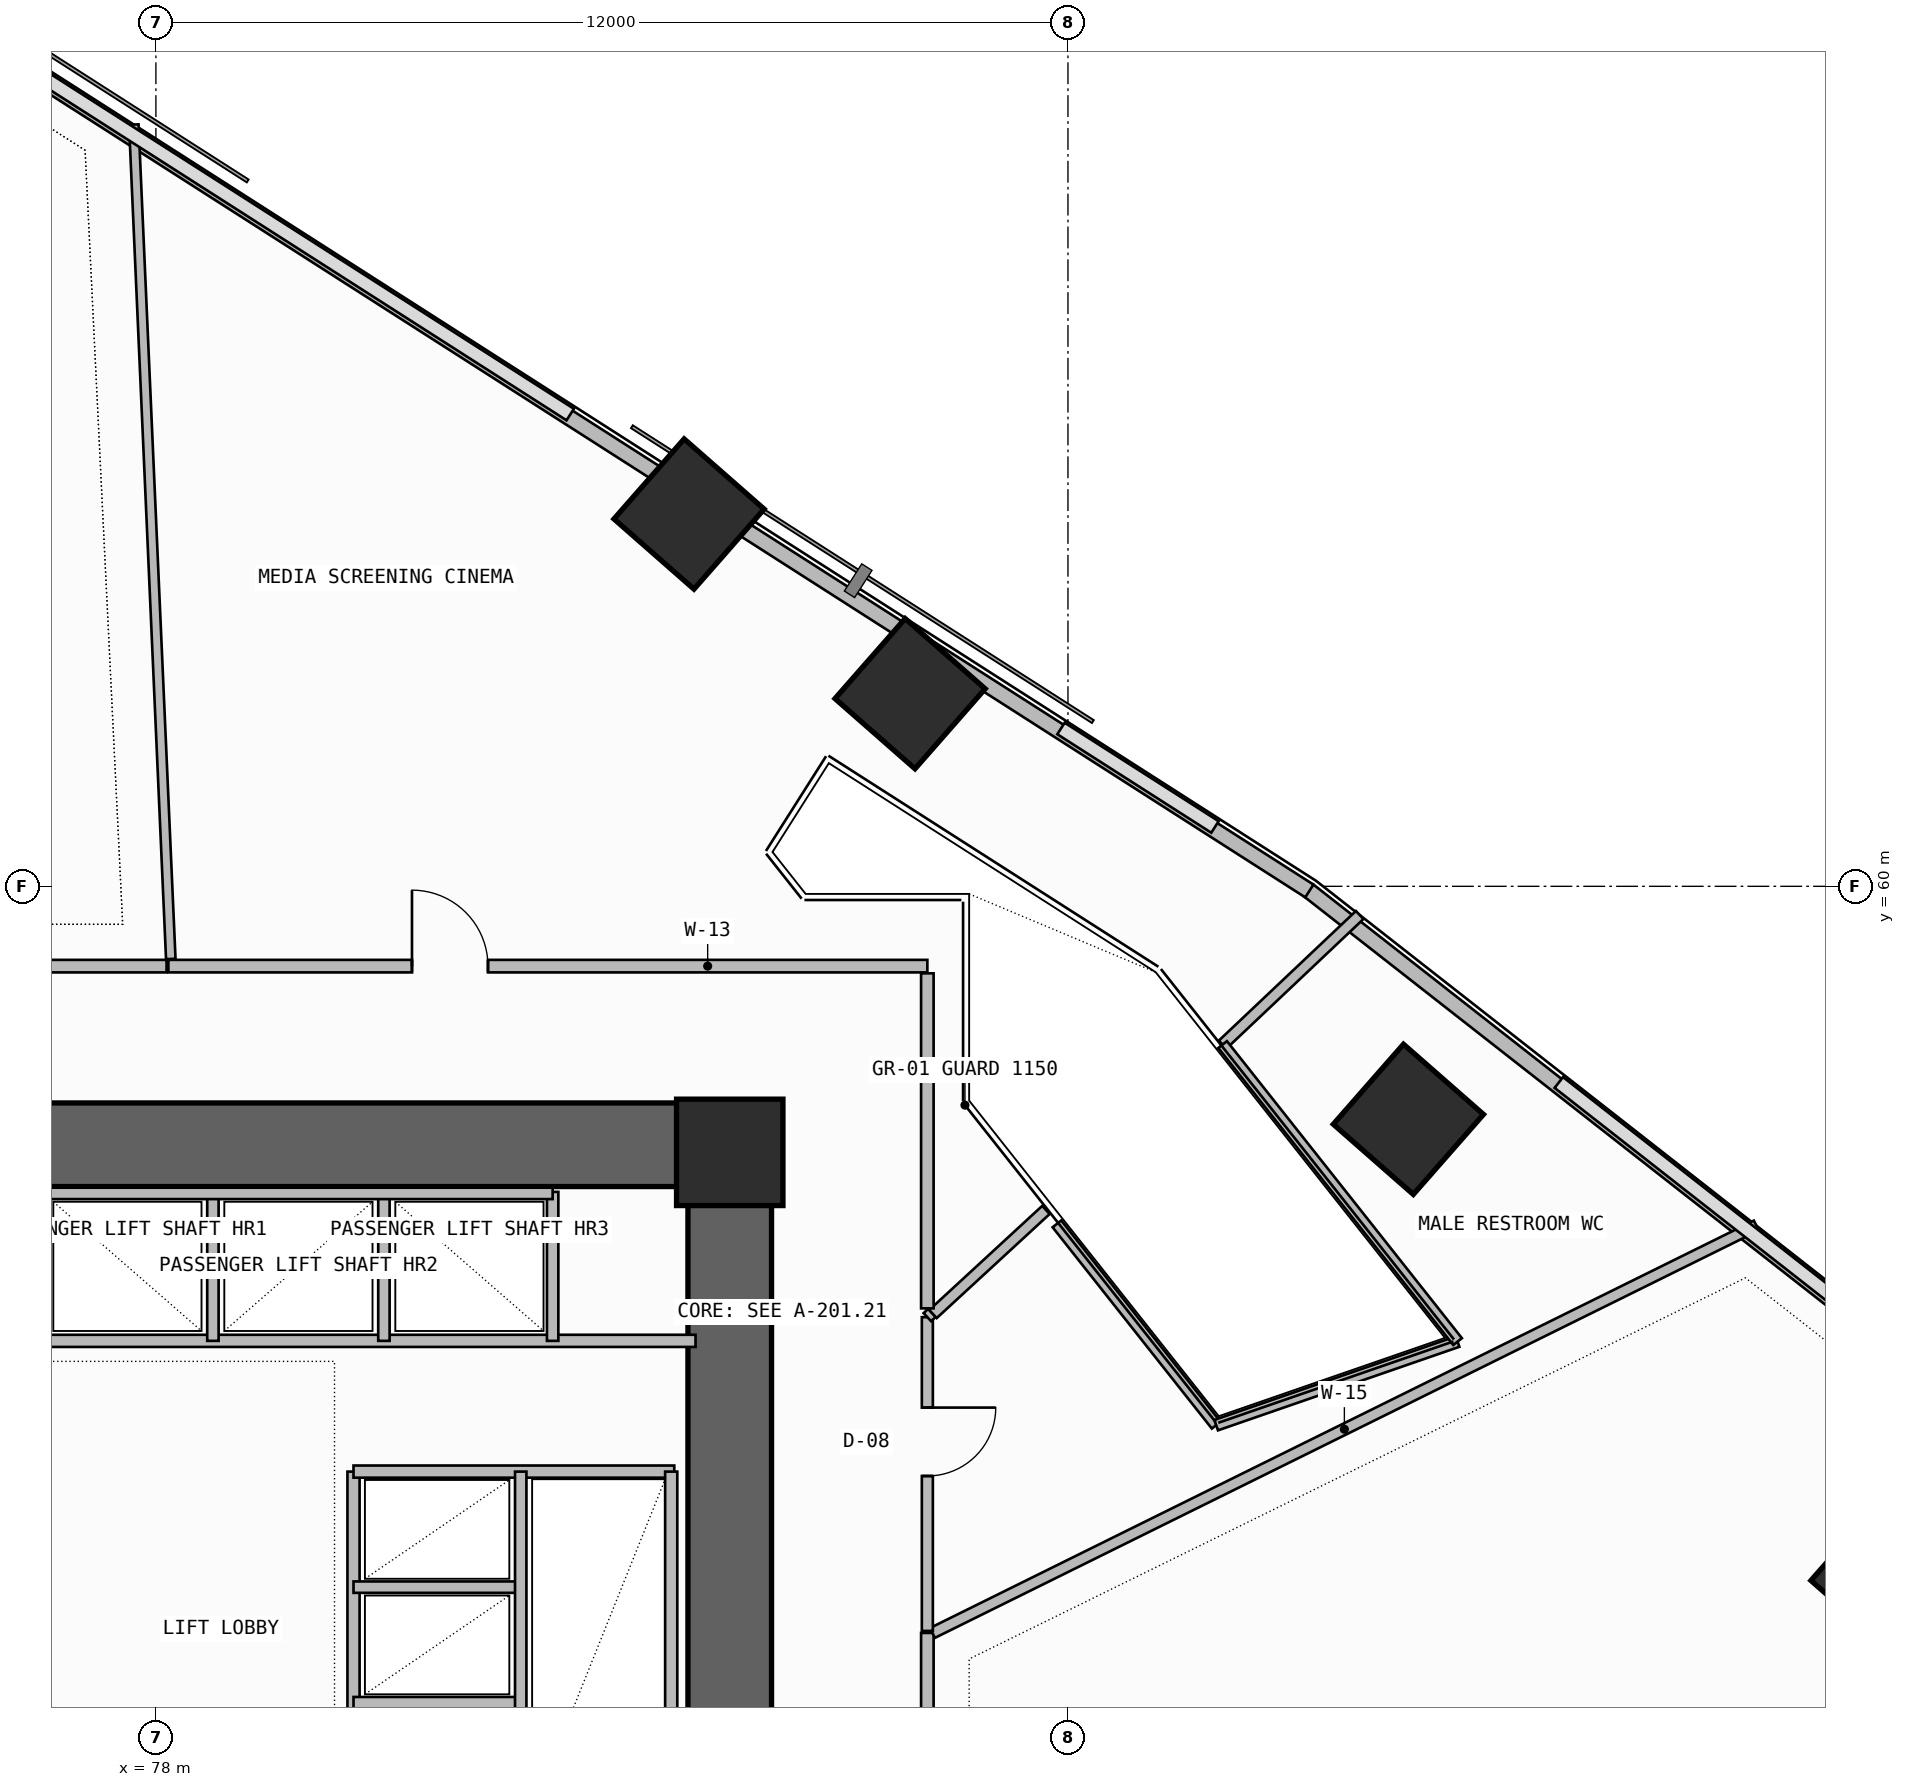
"""IFC4 building model, lengths in metres.
Left out: names, types, materials, properties, quantities, classifications, styles, units other than length and angle.
Written with IfcOpenShell. Run it as: python <this file> out.ifc"""

import sys

from ifc_helpers import new_model, si_unit, direction, frame, frame_2d, origin, origin_2d, place, context, subcontext, project, spatial, rectangle, extrude, element, fill, save


model = new_model("IFC4")
c1 = context("Model", 3, precision=1e-05, world=origin(), true_north=direction((0.0, 1.0)))
c2 = subcontext(c1, "Body", "Model", "MODEL_VIEW")
j1 = project(units=[si_unit("LENGTHUNIT", "METRE"), si_unit("PLANEANGLEUNIT", "RADIAN")], contexts=[c1])
p1 = place(None, origin())
s1 = spatial("IfcSite", under=j1, at=p1, CompositionType="ELEMENT")
p2 = place(p1, origin())
s2 = spatial("IfcBuilding", under=s1, at=p2, CompositionType="ELEMENT")
p3 = place(p2, frame((0.0, 0.0, 74.1)))
s3 = spatial("IfcBuildingStorey", under=s2, at=p3, CompositionType="ELEMENT", Elevation=74.1)
p4 = place(p3, frame((71.8, 56.6, -0.26), z_axis=(0.0, 0.0, 1.0), x_axis=(1.0, 0.0, 0.0)))
e1 = element("IfcWall", 1, at=p4, inside=s3, PredefinedType="SHEAR", context=c2, shape_type="SweptSolid", body=[
    extrude(rectangle(XDim=14.3, YDim=1.1, at=frame_2d((7.15, 0.0))), origin(), (0.0, 0.0, 1.0), 3.6),
])
p5 = place(p3, frame((85.55, 47.6, -0.26), z_axis=(0.0, 0.0, 1.0), x_axis=(0.0, 1.0, 0.0)))
e2 = element("IfcWall", 2, at=p5, inside=s3, PredefinedType="SHEAR", context=c2, shape_type="SweptSolid", body=[
    extrude(rectangle(XDim=8.45, YDim=1.1, at=frame_2d((4.225, 0.0))), origin(), (0.0, 0.0, 1.0), 3.6),
])
for number, where, z_axis, x_axis in (
    (3, (85.55, 56.5, 0.0), (0.0, 0.0, 1.0), (1.0, 0.0, 0.0)),
    (4, (100.763, 50.932, 0.0), (0.0, 0.0, 1.0), (0.659, 0.752, 0.0)),
    (5, (94.479, 56.935, 0.0), (0.0, 0.0, 1.0), (0.659, 0.752, 0.0)),
    (6, (87.923, 62.534, 0.0), (0.0, 0.0, 1.0), (0.659, 0.752, 0.0)),
    (7, (85.015, 64.898, 0.0), (0.0, 0.0, 1.0), (0.659, 0.752, 0.0)),
):
    element("IfcColumn", number, at=place(p3, frame(where, z_axis=z_axis, x_axis=x_axis)), inside=s3, PredefinedType="COLUMN", context=c2, shape_type="SweptSolid", body=[
        extrude(rectangle(XDim=1.4, YDim=1.4, at=origin_2d()), origin(), (0.0, 0.0, 1.0), 3.6),
    ])
p6 = place(p3, frame((121.476, 37.781, 0.0), z_axis=(0.0, 0.0, 1.0), x_axis=(-0.787385636484, 0.61646075257, 0.0)))
e8 = element("IfcWall", 8, at=p6, inside=s3, PredefinedType="PARAPET", context=c2, shape_type="SweptSolid", body=[
    extrude(rectangle(XDim=35.957, YDim=0.2, at=frame_2d((17.979, 0.0))), origin(), (0.0, 0.0, 1.0), 1.15),
])
p7 = place(p3, frame((93.176, 59.939, 0.0), z_axis=(0.0, 0.0, 1.0), x_axis=(-0.842413081081, 0.538832256666, 0.0)))
e9 = element("IfcWall", 9, at=p7, inside=s3, PredefinedType="PARAPET", context=c2, shape_type="SweptSolid", body=[
    extrude(rectangle(XDim=9.011, YDim=0.2, at=frame_2d((4.505, 0.0))), origin(), (0.0, 0.0, 1.0), 1.15),
])
p8 = place(p3, frame((84.682, 65.372, 0.0), z_axis=(0.0, 0.0, 1.0), x_axis=(-0.842418773655, 0.538823356763, 0.0)))
e10 = element("IfcWall", 10, at=p8, inside=s3, PredefinedType="PARAPET", context=c2, shape_type="SweptSolid", body=[
    extrude(rectangle(XDim=19.612, YDim=0.2, at=frame_2d((9.806, 0.0))), origin(), (0.0, 0.0, 1.0), 1.15),
])
p9 = place(p3, frame((80.6, 47.7, 0.0), z_axis=(0.0, 0.0, 1.0), x_axis=(0.0, 1.0, 0.0)))
e11 = element("IfcWall", 11, at=p9, inside=s3, PredefinedType="SOLIDWALL", context=c2, shape_type="SweptSolid", body=[
    extrude(rectangle(XDim=4.6, YDim=0.16, at=frame_2d((2.3, 0.0))), origin(), (0.0, 0.0, 1.0), 3.34),
])
p10 = place(p3, frame((80.6, 52.3, 0.0), z_axis=(0.0, 0.0, 1.0), x_axis=(1.0, 0.0, 0.0)))
e12 = element("IfcWall", 12, at=p10, inside=s3, PredefinedType="SOLIDWALL", context=c2, shape_type="SweptSolid", body=[
    extrude(rectangle(XDim=4.22, YDim=0.16, at=frame_2d((2.11, 0.0))), origin(), (0.0, 0.0, 1.0), 3.34),
])
for number, where, z_axis, x_axis in (
    (13, (80.6, 49.26, 0.0), (0.0, 0.0, 1.0), (1.0, 0.0, 0.0)),
    (14, (80.6, 50.78, 0.0), (0.0, 0.0, 1.0), (1.0, 0.0, 0.0)),
):
    element("IfcWall", number, at=place(p3, frame(where, z_axis=z_axis, x_axis=x_axis)), inside=s3, PredefinedType="PLUMBINGWALL", context=c2, shape_type="SweptSolid", body=[
        extrude(rectangle(XDim=2.2, YDim=0.15, at=frame_2d((1.1, 0.0))), origin(), (0.0, 0.0, 1.0), 3.34),
    ])
p11 = place(p3, frame((82.8, 47.7, 0.0), z_axis=(0.0, 0.0, 1.0), x_axis=(0.0, 1.0, 0.0)))
e15 = element("IfcWall", 15, at=p11, inside=s3, PredefinedType="PLUMBINGWALL", context=c2, shape_type="SweptSolid", body=[
    extrude(rectangle(XDim=4.6, YDim=0.15, at=frame_2d((2.3, 0.0))), origin(), (0.0, 0.0, 1.0), 3.34),
])
p12 = place(p3, frame((84.78, 47.7, 0.0), z_axis=(0.0, 0.0, 1.0), x_axis=(0.0, 1.0, 0.0)))
e16 = element("IfcWall", 16, at=p12, inside=s3, PredefinedType="SOLIDWALL", context=c2, shape_type="SweptSolid", body=[
    extrude(rectangle(XDim=4.6, YDim=0.16, at=frame_2d((2.3, 0.0))), origin(), (0.0, 0.0, 1.0), 3.34),
])
p13 = place(p3, frame((73.02, 54.02, 0.0), z_axis=(0.0, 0.0, 1.0), x_axis=(1.0, 0.0, 0.0)))
e17 = element("IfcWall", 17, at=p13, inside=s3, PredefinedType="SOLIDWALL", context=c2, shape_type="SweptSolid", body=[
    extrude(rectangle(XDim=12.08, YDim=0.16, at=frame_2d((6.04, 0.0))), origin(), (0.0, 0.0, 1.0), 3.34),
])
for number, where, z_axis, x_axis in (
    (18, (78.75, 54.02, 0.0), (0.0, 0.0, 1.0), (0.0, 1.0, 0.0)),
    (19, (81.0, 54.02, 0.0), (0.0, 0.0, 1.0), (0.0, 1.0, 0.0)),
):
    element("IfcWall", number, at=place(p3, frame(where, z_axis=z_axis, x_axis=x_axis)), inside=s3, PredefinedType="PLUMBINGWALL", context=c2, shape_type="SweptSolid", body=[
        extrude(rectangle(XDim=1.96, YDim=0.15, at=frame_2d((0.98, 0.0))), origin(), (0.0, 0.0, 1.0), 3.34),
    ])
p14 = place(p3, frame((83.22, 54.02, 0.0), z_axis=(0.0, 0.0, 1.0), x_axis=(0.0, 1.0, 0.0)))
e20 = element("IfcWall", 20, at=p14, inside=s3, PredefinedType="SOLIDWALL", context=c2, shape_type="SweptSolid", body=[
    extrude(rectangle(XDim=1.96, YDim=0.15, at=frame_2d((0.98, 0.0))), origin(), (0.0, 0.0, 1.0), 3.34),
])
p15 = place(p3, frame((76.52, 55.96, 0.0), z_axis=(0.0, 0.0, 1.0), x_axis=(1.0, 0.0, 0.0)))
e21 = element("IfcWall", 21, at=p15, inside=s3, PredefinedType="SOLIDWALL", context=c2, shape_type="SweptSolid", body=[
    extrude(rectangle(XDim=6.7, YDim=0.15, at=frame_2d((3.35, 0.0))), origin(), (0.0, 0.0, 1.0), 3.34),
])
p16 = place(p3, frame((88.15, 43.95, 0.0), z_axis=(0.0, 0.0, 1.0), x_axis=(0.0, 1.0, 0.0)))
e22 = element("IfcWall", 22, at=p16, inside=s3, PredefinedType="PARTITIONING", context=c2, shape_type="SweptSolid", body=[
    extrude(rectangle(XDim=6.227, YDim=0.165, at=frame_2d((3.114, 0.0))), origin(), (0.0, 0.0, 1.0), 3.34),
])
p17 = place(p16, frame((1.679, 0.0, 0.0)))
e23 = element("IfcOpeningElement", 23, at=p17, cuts=e22, PredefinedType="OPENING", context=c2, shape_type="SweptSolid", body=[
    extrude(rectangle(XDim=1.6, YDim=2.3, at=frame_2d((0.8, 1.15))), frame((0.0, 0.093, 0.0), z_axis=(0.0, -1.0, 0.0), x_axis=(1.0, 0.0, 0.0)), (0.0, 0.0, 1.0), 0.185),
])
p18 = place(p3, frame((88.217, 50.177, 0.0), z_axis=(0.0, 0.0, 1.0), x_axis=(0.896389037866, 0.443268195107, 0.0)))
e24 = element("IfcWall", 24, at=p18, inside=s3, PredefinedType="PARTITIONING", context=c2, shape_type="SweptSolid", body=[
    extrude(rectangle(XDim=12.092, YDim=0.145, at=frame_2d((6.046, 0.0))), origin(), (0.0, 0.0, 1.0), 2.725),
])
p19 = place(p3, frame((88.15, 50.204, 0.0), z_axis=(0.0, 0.0, 1.0), x_axis=(0.0, 1.0, 0.0)))
e25 = element("IfcWall", 25, at=p19, inside=s3, PredefinedType="PARTITIONING", context=c2, shape_type="SweptSolid", body=[
    extrude(rectangle(XDim=4.128, YDim=0.145, at=frame_2d((2.064, 0.0))), origin(), (0.0, 0.0, 1.0), 3.34),
])
p20 = place(p19, frame((2.038, 0.0, 0.0)))
e26 = element("IfcOpeningElement", 26, at=p20, cuts=e25, PredefinedType="OPENING", context=c2, shape_type="SweptSolid", body=[
    extrude(rectangle(XDim=0.9, YDim=2.1, at=frame_2d((0.45, 1.05))), frame((0.0, 0.083, 0.0), z_axis=(0.0, -1.0, 0.0), x_axis=(1.0, 0.0, 0.0)), (0.0, 0.0, 1.0), 0.165),
])
p21 = place(p3, frame((88.15, 54.332, 0.0), z_axis=(0.0, 0.0, 1.0), x_axis=(0.730462531297, 0.682952773164, 0.0)))
e27 = element("IfcWall", 27, at=p21, inside=s3, PredefinedType="PARTITIONING", context=c2, shape_type="SweptSolid", body=[
    extrude(rectangle(XDim=0.082, YDim=0.145, at=frame_2d((0.041, 0.0))), origin(), (0.0, 0.0, 1.0), 3.34),
])
p22 = place(p3, frame((92.035, 57.918, 0.0), z_axis=(0.0, 0.0, 1.0), x_axis=(0.726652905303, 0.687004770882, 0.0)))
e28 = element("IfcWall", 28, at=p22, inside=s3, PredefinedType="PARTITIONING", context=c2, shape_type="SweptSolid", body=[
    extrude(rectangle(XDim=2.481, YDim=0.145, at=frame_2d((1.241, 0.0))), origin(), (0.0, 0.0, 1.0), 2.725),
])
p23 = place(p3, frame((88.224, 54.373, 0.0), z_axis=(0.0, 0.0, 1.0), x_axis=(0.735391410091, 0.677642585707, 0.0)))
e29 = element("IfcWall", 29, at=p23, inside=s3, PredefinedType="PARTITIONING", context=c2, shape_type="SweptSolid", body=[
    extrude(rectangle(XDim=2.021, YDim=0.145, at=frame_2d((1.01, 0.0))), origin(), (0.0, 0.0, 1.0), 3.34),
])
p24 = place(p3, frame((88.15, 58.95, 0.0), z_axis=(0.0, 0.0, 1.0), x_axis=(-1.0, 0.0, 0.0)))
e30 = element("IfcWall", 30, at=p24, inside=s3, PredefinedType="PARTITIONING", context=c2, shape_type="SweptSolid", body=[
    extrude(rectangle(XDim=9.986, YDim=0.165, at=frame_2d((4.993, 0.0))), origin(), (0.0, 0.0, 1.0), 2.725),
])
p25 = place(p24, frame((5.781, 0.0, 0.0)))
e31 = element("IfcOpeningElement", 31, at=p25, cuts=e30, PredefinedType="OPENING", context=c2, shape_type="SweptSolid", body=[
    extrude(rectangle(XDim=1.0, YDim=2.2, at=frame_2d((0.5, 1.1))), frame((0.0, 0.093, 0.0), z_axis=(0.0, -1.0, 0.0), x_axis=(1.0, 0.0, 0.0)), (0.0, 0.0, 1.0), 0.185),
])
p26 = place(p3, frame((88.15, 54.448, 0.0), z_axis=(0.0, 0.0, 1.0), x_axis=(0.0, 1.0, 0.0)))
e32 = element("IfcWall", 32, at=p26, inside=s3, PredefinedType="PARTITIONING", context=c2, shape_type="SweptSolid", body=[
    extrude(rectangle(XDim=4.408, YDim=0.165, at=frame_2d((2.204, 0.0))), origin(), (0.0, 0.0, 1.0), 3.34),
])
p27 = place(p3, frame((78.196, 59.044, 0.0), z_axis=(0.0, 0.0, 1.0), x_axis=(-0.044280871552, 0.999019121146, 0.0)))
e33 = element("IfcWall", 33, at=p27, inside=s3, PredefinedType="PARTITIONING", context=c2, shape_type="SweptSolid", body=[
    extrude(rectangle(XDim=10.988, YDim=0.125, at=frame_2d((5.494, 0.0))), origin(), (0.0, 0.0, 1.0), 2.875),
])
p28 = place(p3, frame((78.14, 58.95, 0.0), z_axis=(0.0, 0.0, 1.0), x_axis=(-1.0, 0.0, 0.0)))
e34 = element("IfcWall", 34, at=p28, inside=s3, PredefinedType="PARTITIONING", context=c2, shape_type="SweptSolid", body=[
    extrude(rectangle(XDim=8.69, YDim=0.165, at=frame_2d((4.345, 0.0))), origin(), (0.0, 0.0, 1.0), 2.725),
])
p29 = place(p28, frame((2.751, 0.0, 0.0)))
e35 = element("IfcOpeningElement", 35, at=p29, cuts=e34, PredefinedType="OPENING", context=c2, shape_type="SweptSolid", body=[
    extrude(rectangle(XDim=1.0, YDim=2.2, at=frame_2d((0.5, 1.1))), frame((0.0, 0.093, 0.0), z_axis=(0.0, -1.0, 0.0), x_axis=(1.0, 0.0, 0.0)), (0.0, 0.0, 1.0), 0.185),
])
p30 = place(p3, frame((89.855, 55.56, 0.0), z_axis=(0.0, 0.0, 1.0), x_axis=(0.620391789011, -0.784292055377, 0.0)))
e36 = element("IfcWall", 36, at=p30, inside=s3, PredefinedType="PARTITIONING", context=c2, shape_type="SweptSolid", body=[
    extrude(rectangle(XDim=3.377, YDim=0.145, at=frame_2d((1.688, 0.0))), origin(), (0.0, 0.0, 1.0), 3.34),
])
p31 = place(p3, frame((91.95, 52.911, 0.0), z_axis=(0.0, 0.0, 1.0), x_axis=(0.945018885272, 0.327015758762, 0.0)))
e37 = element("IfcWall", 37, at=p31, inside=s3, PredefinedType="PARTITIONING", context=c2, shape_type="SweptSolid", body=[
    extrude(rectangle(XDim=3.361, YDim=0.145, at=frame_2d((1.681, 0.0))), origin(), (0.0, 0.0, 1.0), 3.34),
])
p32 = place(p3, frame((95.126, 54.01, 0.0), z_axis=(0.0, 0.0, 1.0), x_axis=(-0.620395425741, 0.784289178632, 0.0)))
e38 = element("IfcWall", 38, at=p32, inside=s3, PredefinedType="PARTITIONING", context=c2, shape_type="SweptSolid", body=[
    extrude(rectangle(XDim=4.983, YDim=0.145, at=frame_2d((2.491, 0.0))), origin(), (0.0, 0.0, 1.0), 3.34),
])
p33 = place(p20, frame((0.9, 0.0, 0.0), z_axis=(0.0, 0.0, 1.0), x_axis=(-1.0, 0.0, 0.0)))
e39 = element("IfcDoor", 39, at=p33, inside=s3, OperationType="SINGLE_SWING_LEFT", PredefinedType="DOOR", context=c2, shape_type="SweptSolid", body=[
    extrude(rectangle(XDim=0.9, YDim=2.1, at=frame_2d((0.45, 1.05))), frame((0.0, 0.025, 0.0), z_axis=(0.0, -1.0, 0.0), x_axis=(1.0, 0.0, 0.0)), (0.0, 0.0, 1.0), 0.05),
])
fill(e26, e39)
p34 = place(p25, frame((1.0, 0.0, 0.0), z_axis=(0.0, 0.0, 1.0), x_axis=(-1.0, 0.0, 0.0)))
e40 = element("IfcDoor", 40, at=p34, inside=s3, OperationType="SINGLE_SWING_LEFT", PredefinedType="DOOR", context=c2, shape_type="SweptSolid", body=[
    extrude(rectangle(XDim=1.0, YDim=2.2, at=frame_2d((0.5, 1.1))), frame((0.0, 0.025, 0.0), z_axis=(0.0, -1.0, 0.0), x_axis=(1.0, 0.0, 0.0)), (0.0, 0.0, 1.0), 0.05),
])
fill(e31, e40)
save(model, sys.argv[1])
